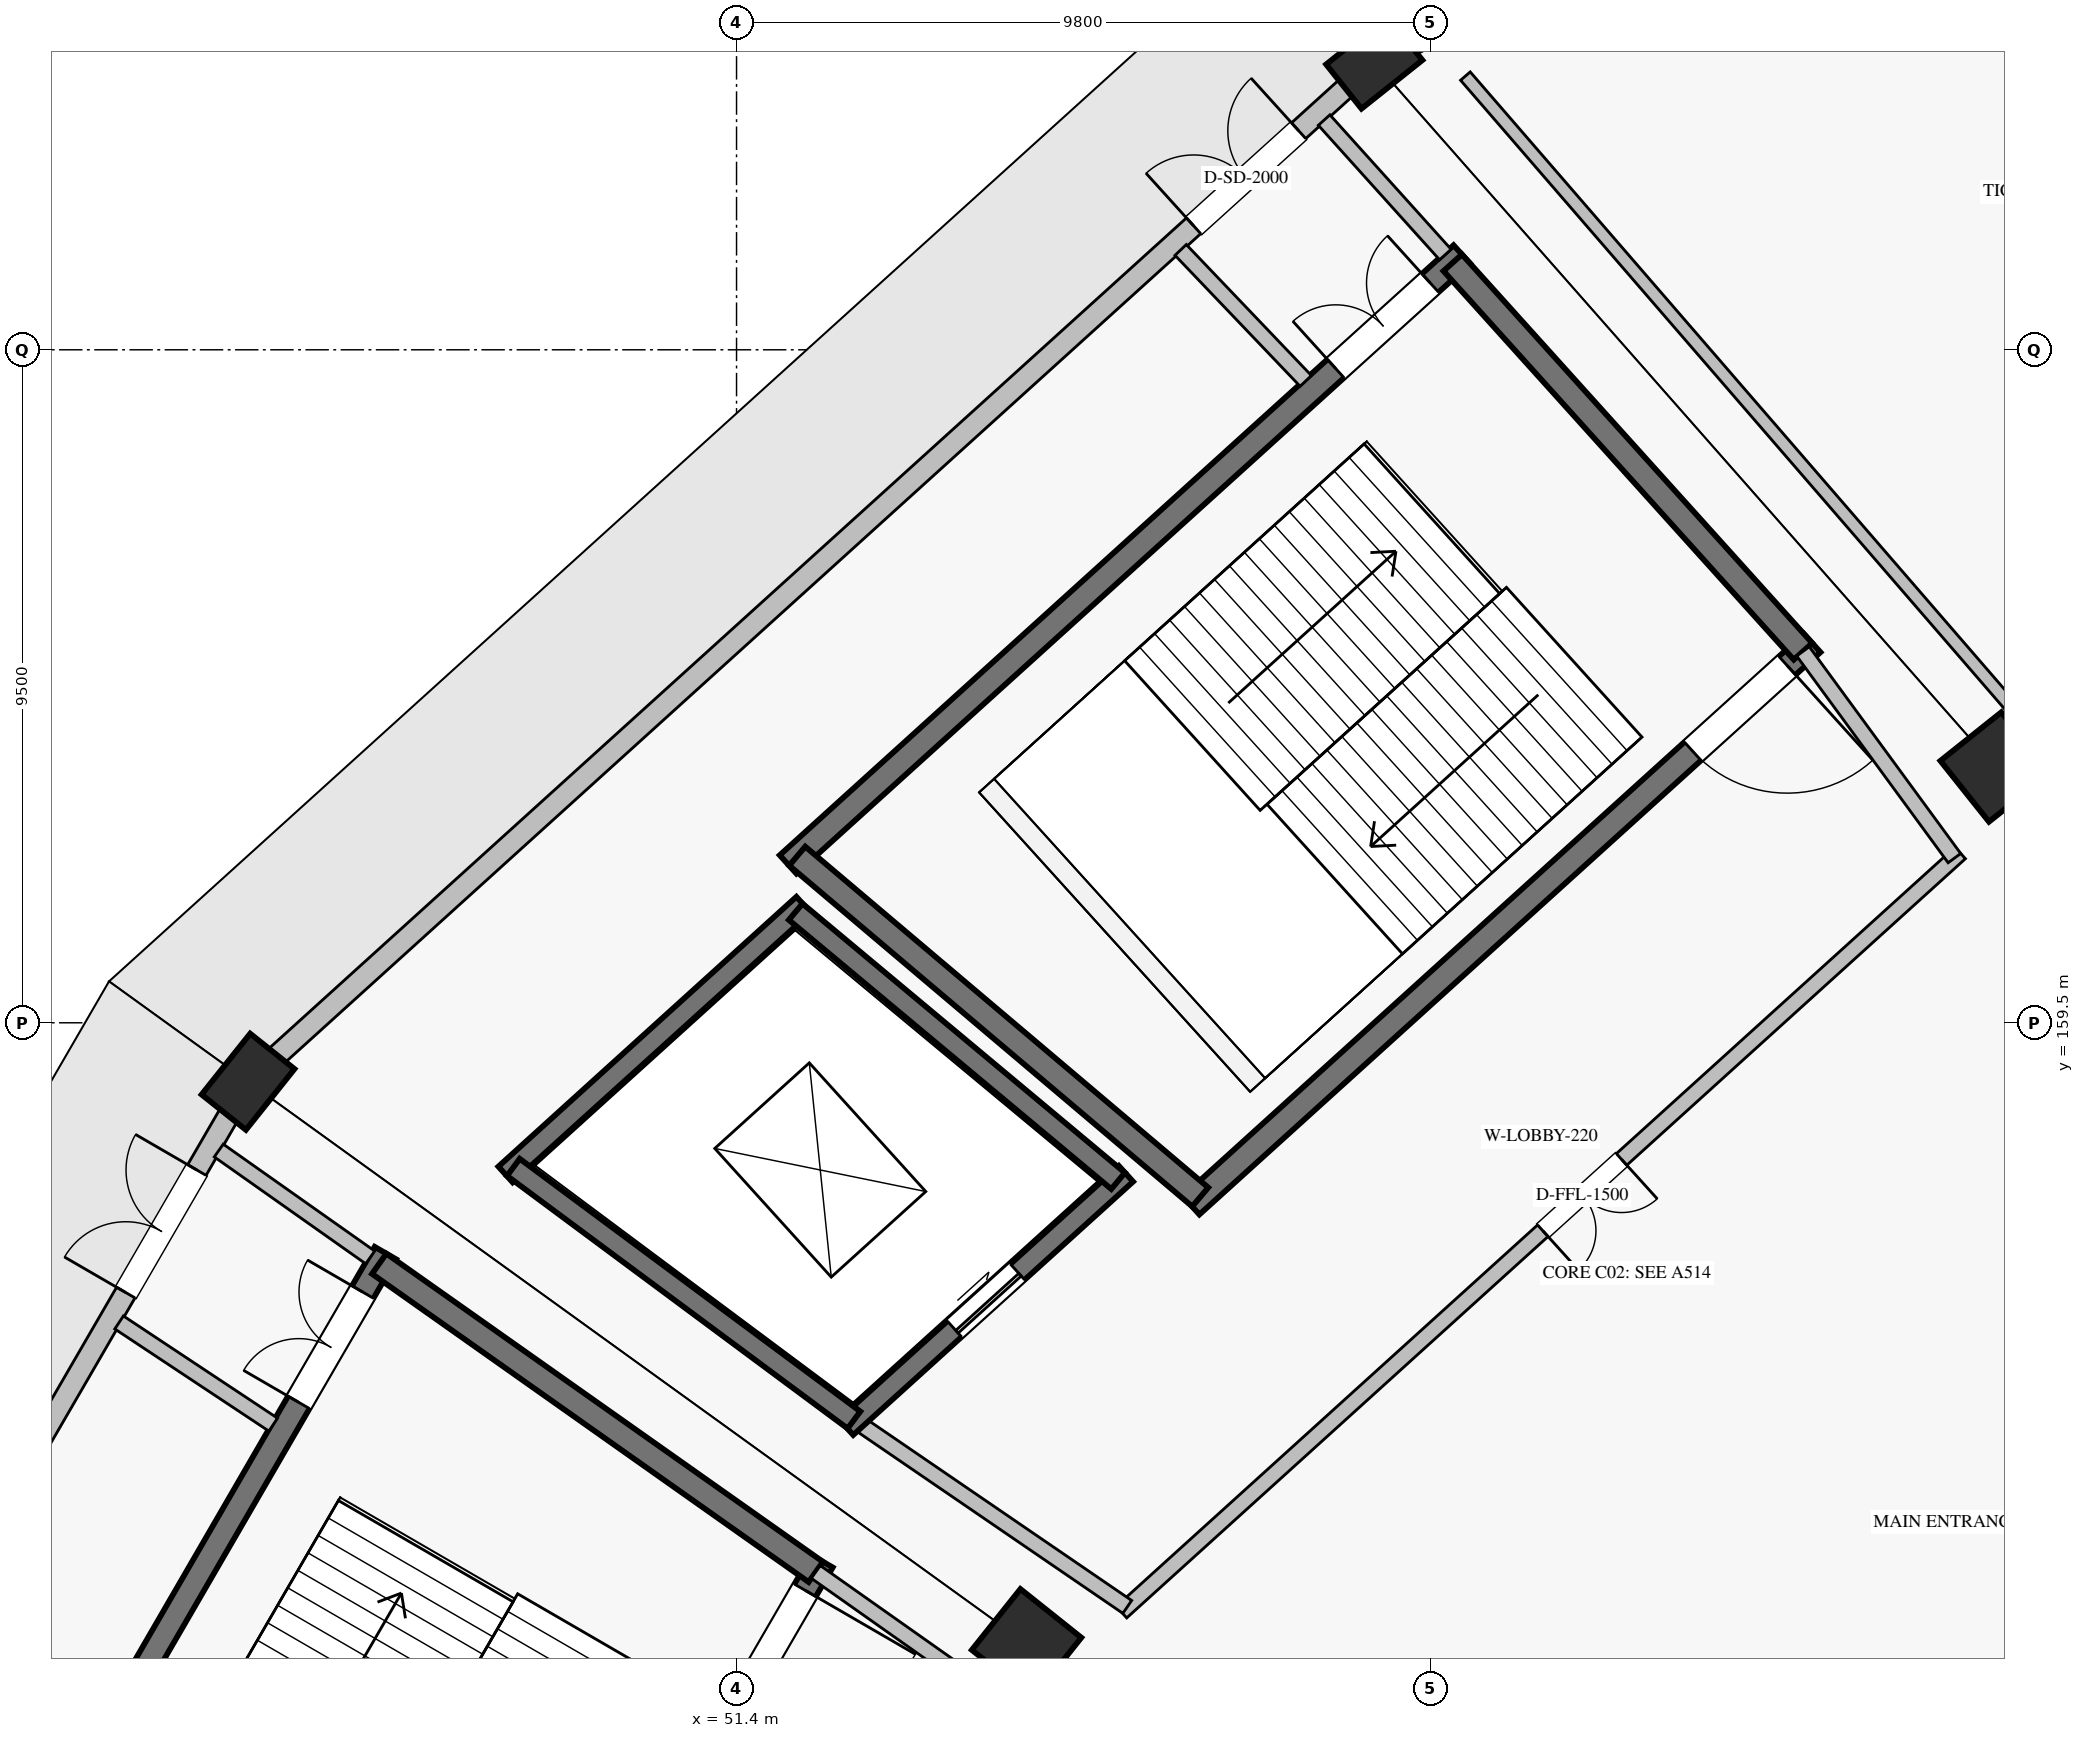
"""IFC4 building model, lengths in metres.
Left out: names, types, materials, properties, quantities, classifications, styles, units other than length and angle.
Written with IfcOpenShell. Run it as: python <this file> out.ifc"""

import sys

from ifc_helpers import new_model, si_unit, direction, frame, frame_2d, origin, origin_2d, place, context, subcontext, project, spatial, rectangle, extrude, element, fill, save


model = new_model("IFC4")
c1 = context("Model", 3, precision=1e-05, world=origin(), true_north=direction((0.0, 1.0)))
c2 = subcontext(c1, "Body", "Model", "MODEL_VIEW")
j1 = project(units=[si_unit("LENGTHUNIT", "METRE"), si_unit("PLANEANGLEUNIT", "RADIAN")], contexts=[c1])
p1 = place(None, origin())
s1 = spatial("IfcSite", under=j1, at=p1, CompositionType="ELEMENT")
p2 = place(p1, origin())
s2 = spatial("IfcBuilding", under=s1, at=p2, CompositionType="ELEMENT")
p3 = place(p2, origin())
s3 = spatial("IfcBuildingStorey", under=s2, at=p3, CompositionType="ELEMENT", Elevation=0.0)
for number, where, z_axis, x_axis in (
    (1, (69.166, 163.111, 0.0), (0.0, 0.0, 1.0), (-0.623, 0.782, 0.0)),
    (2, (55.494, 150.734, 0.0), (0.0, 0.0, 1.0), (-0.782, 0.623, 0.0)),
):
    element("IfcColumn", number, at=place(p3, frame(where, z_axis=z_axis, x_axis=x_axis)), inside=s3, PredefinedType="COLUMN", context=c2, shape_type="SweptSolid", body=[
        extrude(rectangle(XDim=1.1, YDim=1.1, at=origin_2d()), origin(), (0.0, 0.0, 1.0), 5.78),
    ])
for number, where, z_axis, x_axis in (
    (3, (60.402, 173.059, 0.0), (0.0, 0.0, 1.0), (-0.623, 0.782, 0.0)),
    (4, (44.505, 158.668, 0.0), (0.0, 0.0, 1.0), (-0.782, 0.623, 0.0)),
):
    element("IfcColumn", number, at=place(p3, frame(where, z_axis=z_axis, x_axis=x_axis)), inside=s3, PredefinedType="COLUMN", context=c2, shape_type="SweptSolid", body=[
        extrude(rectangle(XDim=0.8, YDim=1.1, at=origin_2d()), origin(), (0.0, 0.0, 1.0), 5.78),
    ])
p4 = place(p3, frame((79.843, 182.297, 0.0), z_axis=(0.0, 0.0, 1.0), x_axis=(-0.903214032263, -0.429190414528, 0.0)))
e5 = element("IfcWall", 5, at=p4, inside=s3, PredefinedType="SOLIDWALL", context=c2, shape_type="SweptSolid", body=[
    extrude(rectangle(XDim=21.134, YDim=0.3, at=frame_2d((10.567, 0.0))), origin(), (0.0, 0.0, 1.0), 4.8),
])
p5 = place(p4, frame((2.504, 0.0, 0.0)))
e6 = element("IfcOpeningElement", 6, at=p5, cuts=e5, PredefinedType="OPENING", context=c2, shape_type="SweptSolid", body=[
    extrude(rectangle(XDim=2.6, YDim=2.4, at=frame_2d((1.3, 1.2))), frame((0.0, 0.16, 0.0), z_axis=(0.0, -1.0, 0.0), x_axis=(1.0, 0.0, 0.0)), (0.0, 0.0, 1.0), 0.32),
])
p6 = place(p4, frame((13.894, 0.0, 1.1)))
e7 = element("IfcOpeningElement", 7, at=p6, cuts=e5, PredefinedType="OPENING", context=c2, shape_type="SweptSolid", body=[
    extrude(rectangle(XDim=1.8, YDim=1.5, at=frame_2d((0.9, 0.75))), frame((0.0, 0.16, 0.0), z_axis=(0.0, -1.0, 0.0), x_axis=(1.0, 0.0, 0.0)), (0.0, 0.0, 1.0), 0.32),
])
p7 = place(p3, frame((60.113, 172.797, 0.0), z_axis=(0.0, 0.0, 1.0), x_axis=(-0.741354093053, -0.671114080253, 0.0)))
e8 = element("IfcWall", 8, at=p7, inside=s3, PredefinedType="SOLIDWALL", context=c2, shape_type="SweptSolid", body=[
    extrude(rectangle(XDim=20.664, YDim=0.3, at=frame_2d((10.332, 0.0))), origin(), (0.0, 0.0, 1.0), 4.8),
])
p8 = place(p7, frame((1.05, 0.0, 0.0)))
e9 = element("IfcOpeningElement", 9, at=p8, cuts=e8, PredefinedType="OPENING", context=c2, shape_type="SweptSolid", body=[
    extrude(rectangle(XDim=2.0, YDim=2.3, at=frame_2d((1.0, 1.15))), frame((0.0, 0.16, 0.0), z_axis=(0.0, -1.0, 0.0), x_axis=(1.0, 0.0, 0.0)), (0.0, 0.0, 1.0), 0.32),
])
p9 = place(p3, frame((44.309, 158.33, 0.0), z_axis=(0.0, 0.0, 1.0), x_axis=(-0.501609752715, -0.865094015689, 0.0)))
e10 = element("IfcWall", 10, at=p9, inside=s3, PredefinedType="SOLIDWALL", context=c2, shape_type="SweptSolid", body=[
    extrude(rectangle(XDim=19.932, YDim=0.3, at=frame_2d((9.966, 0.0))), origin(), (0.0, 0.0, 1.0), 4.8),
])
p10 = place(p9, frame((1.05, 0.0, 0.0)))
e11 = element("IfcOpeningElement", 11, at=p10, cuts=e10, PredefinedType="OPENING", context=c2, shape_type="SweptSolid", body=[
    extrude(rectangle(XDim=2.0, YDim=2.3, at=frame_2d((1.0, 1.15))), frame((0.0, 0.16, 0.0), z_axis=(0.0, -1.0, 0.0), x_axis=(1.0, 0.0, 0.0)), (0.0, 0.0, 1.0), 0.32),
])
p11 = place(p3, frame((66.583, 164.86, 0.0), z_axis=(0.0, 0.0, 1.0), x_axis=(-0.741348929385, -0.671119784315, 0.0)))
e12 = element("IfcWall", 12, at=p11, inside=s3, PredefinedType="SHEAR", context=c2, shape_type="SweptSolid", body=[
    extrude(rectangle(XDim=11.826, YDim=0.35, at=frame_2d((5.913, 0.0))), origin(), (0.0, 0.0, 1.0), 5.5),
])
p12 = place(p11, frame((0.475, 0.0, 0.0)))
e13 = element("IfcOpeningElement", 13, at=p12, cuts=e12, PredefinedType="OPENING", context=c2, shape_type="SweptSolid", body=[
    extrude(rectangle(XDim=1.8, YDim=2.2, at=frame_2d((0.9, 1.1))), frame((0.0, 0.185, 0.0), z_axis=(0.0, -1.0, 0.0), x_axis=(1.0, 0.0, 0.0)), (0.0, 0.0, 1.0), 0.37),
])
p13 = place(p3, frame((61.639, 170.347, 0.0), z_axis=(0.0, 0.0, 1.0), x_axis=(-0.741351373721, -0.671117084183, 0.0)))
e14 = element("IfcWall", 14, at=p13, inside=s3, PredefinedType="SHEAR", context=c2, shape_type="SweptSolid", body=[
    extrude(rectangle(XDim=12.83, YDim=0.35, at=frame_2d((6.415, 0.0))), origin(), (0.0, 0.0, 1.0), 5.5),
])
p14 = place(p13, frame((0.602, 0.0, 0.0)))
e15 = element("IfcOpeningElement", 15, at=p14, cuts=e14, PredefinedType="OPENING", context=c2, shape_type="SweptSolid", body=[
    extrude(rectangle(XDim=1.8, YDim=2.2, at=frame_2d((0.9, 1.1))), frame((0.0, 0.185, 0.0), z_axis=(0.0, -1.0, 0.0), x_axis=(1.0, 0.0, 0.0)), (0.0, 0.0, 1.0), 0.37),
])
p15 = place(p3, frame((61.405, 170.344, 0.0), z_axis=(0.0, 0.0, 1.0), x_axis=(-0.669523961342, 0.742790458467, 0.0)))
e16 = element("IfcWall", 16, at=p15, inside=s3, PredefinedType="SOLIDWALL", context=c2, shape_type="SweptSolid", body=[
    extrude(rectangle(XDim=2.556, YDim=0.22, at=frame_2d((1.278, 0.0))), origin(), (0.0, 0.0, 1.0), 5.5),
])
p16 = place(p3, frame((59.435, 168.561, 0.0), z_axis=(0.0, 0.0, 1.0), x_axis=(-0.690686933178, 0.7231538981, 0.0)))
e17 = element("IfcWall", 17, at=p16, inside=s3, PredefinedType="SOLIDWALL", context=c2, shape_type="SweptSolid", body=[
    extrude(rectangle(XDim=2.557, YDim=0.22, at=frame_2d((1.278, 0.0))), origin(), (0.0, 0.0, 1.0), 5.5),
])
p17 = place(p3, frame((66.454, 164.743, 0.0), z_axis=(0.0, 0.0, 1.0), x_axis=(-0.669463145673, 0.742845270958, 0.0)))
e18 = element("IfcWall", 18, at=p17, inside=s3, PredefinedType="SHEAR", context=c2, shape_type="SweptSolid", body=[
    extrude(rectangle(XDim=7.386, YDim=0.35, at=frame_2d((3.693, 0.0))), origin(), (0.0, 0.0, 1.0), 5.5),
])
p18 = place(p3, frame((57.945, 157.041, 0.0), z_axis=(0.0, 0.0, 1.0), x_axis=(-0.763422324031, 0.64589964791, 0.0)))
e19 = element("IfcWall", 19, at=p18, inside=s3, PredefinedType="SHEAR", context=c2, shape_type="SweptSolid", body=[
    extrude(rectangle(XDim=7.452, YDim=0.35, at=frame_2d((3.726, 0.0))), origin(), (0.0, 0.0, 1.0), 5.5),
])
p19 = place(p3, frame((56.897, 157.369, 0.0), z_axis=(0.0, 0.0, 1.0), x_axis=(-0.741350155641, -0.671118429736, 0.0)))
e20 = element("IfcWall", 20, at=p19, inside=s3, PredefinedType="SHEAR", context=c2, shape_type="SweptSolid", body=[
    extrude(rectangle(XDim=5.329, YDim=0.3, at=frame_2d((2.665, 0.0))), origin(), (0.0, 0.0, 1.0), 5.5),
])
p20 = place(p19, frame((2.065, 0.0, 0.0)))
e21 = element("IfcOpeningElement", 21, at=p20, cuts=e20, PredefinedType="OPENING", context=c2, shape_type="SweptSolid", body=[
    extrude(rectangle(XDim=1.2, YDim=2.2, at=frame_2d((0.6, 1.1))), frame((0.0, 0.16, 0.0), z_axis=(0.0, -1.0, 0.0), x_axis=(1.0, 0.0, 0.0)), (0.0, 0.0, 1.0), 0.32),
])
p21 = place(p3, frame((52.346, 161.168, 0.0), z_axis=(0.0, 0.0, 1.0), x_axis=(-0.74134208775, -0.671127341815, 0.0)))
e22 = element("IfcWall", 22, at=p21, inside=s3, PredefinedType="SHEAR", context=c2, shape_type="SweptSolid", body=[
    extrude(rectangle(XDim=5.675, YDim=0.3, at=frame_2d((2.837, 0.0))), origin(), (0.0, 0.0, 1.0), 5.5),
])
p22 = place(p3, frame((56.786, 157.268, 0.0), z_axis=(0.0, 0.0, 1.0), x_axis=(-0.767711354146, 0.640795815151, 0.0)))
e23 = element("IfcWall", 23, at=p22, inside=s3, PredefinedType="SHEAR", context=c2, shape_type="SweptSolid", body=[
    extrude(rectangle(XDim=5.929, YDim=0.3, at=frame_2d((2.964, 0.0))), origin(), (0.0, 0.0, 1.0), 5.5),
])
p23 = place(p3, frame((53.058, 153.893, 0.0), z_axis=(0.0, 0.0, 1.0), x_axis=(-0.803101805449, 0.59584183311, 0.0)))
e24 = element("IfcWall", 24, at=p23, inside=s3, PredefinedType="SHEAR", context=c2, shape_type="SweptSolid", body=[
    extrude(rectangle(XDim=5.986, YDim=0.3, at=frame_2d((2.993, 0.0))), origin(), (0.0, 0.0, 1.0), 5.5),
])
p24 = place(p3, frame((68.673, 161.898, 0.0), z_axis=(0.0, 0.0, 1.0), x_axis=(-0.741351035574, -0.671117457717, 0.0)))
e25 = element("IfcWall", 25, at=p24, inside=s3, PredefinedType="SOLIDWALL", context=c2, shape_type="SweptSolid", body=[
    extrude(rectangle(XDim=15.969, YDim=0.22, at=frame_2d((7.985, 0.0))), origin(), (0.0, 0.0, 1.0), 5.5),
])
p25 = place(p24, frame((6.447, 0.0, 0.0)))
e26 = element("IfcOpeningElement", 26, at=p25, cuts=e25, PredefinedType="OPENING", context=c2, shape_type="SweptSolid", body=[
    extrude(rectangle(XDim=1.5, YDim=2.2, at=frame_2d((0.75, 1.1))), frame((0.0, 0.12, 0.0), z_axis=(0.0, -1.0, 0.0), x_axis=(1.0, 0.0, 0.0)), (0.0, 0.0, 1.0), 0.24),
])
p26 = place(p3, frame((68.591, 161.824, 0.0), z_axis=(0.0, 0.0, 1.0), x_axis=(-0.590836915359, 0.806791013491, 0.0)))
e27 = element("IfcWall", 27, at=p26, inside=s3, PredefinedType="SOLIDWALL", context=c2, shape_type="SweptSolid", body=[
    extrude(rectangle(XDim=3.618, YDim=0.22, at=frame_2d((1.809, 0.0))), origin(), (0.0, 0.0, 1.0), 5.5),
])
p27 = place(p3, frame((56.915, 151.254, 0.0), z_axis=(0.0, 0.0, 1.0), x_axis=(-0.825385410642, 0.564569680287, 0.0)))
e28 = element("IfcWall", 28, at=p27, inside=s3, PredefinedType="SOLIDWALL", context=c2, shape_type="SweptSolid", body=[
    extrude(rectangle(XDim=4.674, YDim=0.22, at=frame_2d((2.337, 0.0))), origin(), (0.0, 0.0, 1.0), 5.5),
])
p28 = place(p3, frame((52.606, 151.9, 0.0), z_axis=(0.0, 0.0, 1.0), x_axis=(-0.501587404838, -0.865106973332, 0.0)))
e29 = element("IfcWall", 29, at=p28, inside=s3, PredefinedType="SHEAR", context=c2, shape_type="SweptSolid", body=[
    extrude(rectangle(XDim=11.435, YDim=0.35, at=frame_2d((5.718, 0.0))), origin(), (0.0, 0.0, 1.0), 5.5),
])
p29 = place(p28, frame((0.475, 0.0, 0.0)))
e30 = element("IfcOpeningElement", 30, at=p29, cuts=e29, PredefinedType="OPENING", context=c2, shape_type="SweptSolid", body=[
    extrude(rectangle(XDim=1.8, YDim=2.2, at=frame_2d((0.9, 1.1))), frame((0.0, 0.185, 0.0), z_axis=(0.0, -1.0, 0.0), x_axis=(1.0, 0.0, 0.0)), (0.0, 0.0, 1.0), 0.37),
])
p30 = place(p3, frame((46.443, 156.25, 0.0), z_axis=(0.0, 0.0, 1.0), x_axis=(-0.501601740165, -0.865098661577, 0.0)))
e31 = element("IfcWall", 31, at=p30, inside=s3, PredefinedType="SHEAR", context=c2, shape_type="SweptSolid", body=[
    extrude(rectangle(XDim=12.405, YDim=0.35, at=frame_2d((6.202, 0.0))), origin(), (0.0, 0.0, 1.0), 5.5),
])
p31 = place(p30, frame((0.637, 0.0, 0.0)))
e32 = element("IfcOpeningElement", 32, at=p31, cuts=e31, PredefinedType="OPENING", context=c2, shape_type="SweptSolid", body=[
    extrude(rectangle(XDim=1.8, YDim=2.2, at=frame_2d((0.9, 1.1))), frame((0.0, 0.185, 0.0), z_axis=(0.0, -1.0, 0.0), x_axis=(1.0, 0.0, 0.0)), (0.0, 0.0, 1.0), 0.37),
])
p32 = place(p3, frame((46.229, 156.188, 0.0), z_axis=(0.0, 0.0, 1.0), x_axis=(-0.816998892692, 0.576639236733, 0.0)))
e33 = element("IfcWall", 33, at=p32, inside=s3, PredefinedType="SOLIDWALL", context=c2, shape_type="SweptSolid", body=[
    extrude(rectangle(XDim=2.616, YDim=0.22, at=frame_2d((1.308, 0.0))), origin(), (0.0, 0.0, 1.0), 5.5),
])
p33 = place(p3, frame((44.86, 153.827, 0.0), z_axis=(0.0, 0.0, 1.0), x_axis=(-0.833386125642, 0.552691202741, 0.0)))
e34 = element("IfcWall", 34, at=p33, inside=s3, PredefinedType="SOLIDWALL", context=c2, shape_type="SweptSolid", body=[
    extrude(rectangle(XDim=2.61, YDim=0.22, at=frame_2d((1.305, 0.0))), origin(), (0.0, 0.0, 1.0), 5.5),
])
p34 = place(p3, frame((52.519, 151.748, 0.0), z_axis=(0.0, 0.0, 1.0), x_axis=(-0.816983109824, 0.576661597701, 0.0)))
e35 = element("IfcWall", 35, at=p34, inside=s3, PredefinedType="SHEAR", context=c2, shape_type="SweptSolid", body=[
    extrude(rectangle(XDim=7.544, YDim=0.35, at=frame_2d((3.772, 0.0))), origin(), (0.0, 0.0, 1.0), 5.5),
])
p35 = place(p3, frame((54.889, 150.075, 0.0), z_axis=(0.0, 0.0, 1.0), x_axis=(-0.816984187086, 0.57666007149, 0.0)))
e36 = element("IfcWall", 36, at=p35, inside=s3, PredefinedType="SOLIDWALL", context=c2, shape_type="SweptSolid", body=[
    extrude(rectangle(XDim=2.901, YDim=0.22, at=frame_2d((1.451, 0.0))), origin(), (0.0, 0.0, 1.0), 5.5),
])
p36 = place(p3, frame((69.599, 163.72, 0.0), z_axis=(0.0, 0.0, 1.0), x_axis=(-0.654293035882, 0.756241114458, 0.0)))
e37 = element("IfcWall", 37, at=p36, inside=s3, PredefinedType="PARTITIONING", context=c2, shape_type="SweptSolid", body=[
    extrude(rectangle(XDim=12.091, YDim=0.18, at=frame_2d((6.045, 0.0))), origin(), (0.0, 0.0, 1.0), 4.82),
])
p37 = place(p8, frame((2.0, 0.0, 0.0), z_axis=(0.0, 0.0, 1.0), x_axis=(-1.0, 0.0, 0.0)))
e38 = element("IfcDoor", 38, at=p37, inside=s3, OperationType="DOUBLE_DOOR_SINGLE_SWING", PredefinedType="DOOR", context=c2, shape_type="SweptSolid", body=[
    extrude(rectangle(XDim=2.0, YDim=2.3, at=frame_2d((1.0, 1.15))), frame((0.0, 0.025, 0.0), z_axis=(0.0, -1.0, 0.0), x_axis=(1.0, 0.0, 0.0)), (0.0, 0.0, 1.0), 0.05),
])
fill(e9, e38)
p38 = place(p10, frame((2.0, 0.0, 0.0), z_axis=(0.0, 0.0, 1.0), x_axis=(-1.0, 0.0, 0.0)))
e39 = element("IfcDoor", 39, at=p38, inside=s3, OperationType="DOUBLE_DOOR_SINGLE_SWING", PredefinedType="DOOR", context=c2, shape_type="SweptSolid", body=[
    extrude(rectangle(XDim=2.0, YDim=2.3, at=frame_2d((1.0, 1.15))), frame((0.0, 0.025, 0.0), z_axis=(0.0, -1.0, 0.0), x_axis=(1.0, 0.0, 0.0)), (0.0, 0.0, 1.0), 0.05),
])
fill(e11, e39)
p39 = place(p14, frame((1.8, 0.0, 0.0), z_axis=(0.0, 0.0, 1.0), x_axis=(-1.0, 0.0, 0.0)))
e40 = element("IfcDoor", 40, at=p39, inside=s3, OperationType="DOUBLE_DOOR_SINGLE_SWING", PredefinedType="DOOR", context=c2, shape_type="SweptSolid", body=[
    extrude(rectangle(XDim=1.8, YDim=2.2, at=frame_2d((0.9, 1.1))), frame((0.0, 0.025, 0.0), z_axis=(0.0, -1.0, 0.0), x_axis=(1.0, 0.0, 0.0)), (0.0, 0.0, 1.0), 0.05),
])
fill(e15, e40)
p40 = place(p12, origin())
e41 = element("IfcDoor", 41, at=p40, inside=s3, OperationType="SINGLE_SWING_LEFT", PredefinedType="DOOR", context=c2, shape_type="SweptSolid", body=[
    extrude(rectangle(XDim=1.8, YDim=2.2, at=frame_2d((0.9, 1.1))), frame((0.0, 0.025, 0.0), z_axis=(0.0, -1.0, 0.0), x_axis=(1.0, 0.0, 0.0)), (0.0, 0.0, 1.0), 0.05),
])
fill(e13, e41)
p41 = place(p20, origin())
e42 = element("IfcDoor", 42, at=p41, inside=s3, OperationType="SLIDING_TO_LEFT", PredefinedType="DOOR", context=c2, shape_type="SweptSolid", body=[
    extrude(rectangle(XDim=1.2, YDim=2.2, at=frame_2d((0.6, 1.1))), frame((0.0, 0.025, 0.0), z_axis=(0.0, -1.0, 0.0), x_axis=(1.0, 0.0, 0.0)), (0.0, 0.0, 1.0), 0.05),
])
fill(e21, e42)
p42 = place(p25, origin())
e43 = element("IfcDoor", 43, at=p42, inside=s3, OperationType="DOUBLE_DOOR_SINGLE_SWING", PredefinedType="DOOR", context=c2, shape_type="SweptSolid", body=[
    extrude(rectangle(XDim=1.5, YDim=2.2, at=frame_2d((0.75, 1.1))), frame((0.0, 0.025, 0.0), z_axis=(0.0, -1.0, 0.0), x_axis=(1.0, 0.0, 0.0)), (0.0, 0.0, 1.0), 0.05),
])
fill(e26, e43)
p43 = place(p31, frame((1.8, 0.0, 0.0), z_axis=(0.0, 0.0, 1.0), x_axis=(-1.0, 0.0, 0.0)))
e44 = element("IfcDoor", 44, at=p43, inside=s3, OperationType="DOUBLE_DOOR_SINGLE_SWING", PredefinedType="DOOR", context=c2, shape_type="SweptSolid", body=[
    extrude(rectangle(XDim=1.8, YDim=2.2, at=frame_2d((0.9, 1.1))), frame((0.0, 0.025, 0.0), z_axis=(0.0, -1.0, 0.0), x_axis=(1.0, 0.0, 0.0)), (0.0, 0.0, 1.0), 0.05),
])
fill(e32, e44)
p44 = place(p29, origin())
e45 = element("IfcDoor", 45, at=p44, inside=s3, OperationType="SINGLE_SWING_LEFT", PredefinedType="DOOR", context=c2, shape_type="SweptSolid", body=[
    extrude(rectangle(XDim=1.8, YDim=2.2, at=frame_2d((0.9, 1.1))), frame((0.0, 0.025, 0.0), z_axis=(0.0, -1.0, 0.0), x_axis=(1.0, 0.0, 0.0)), (0.0, 0.0, 1.0), 0.05),
])
fill(e30, e45)
save(model, sys.argv[1])
